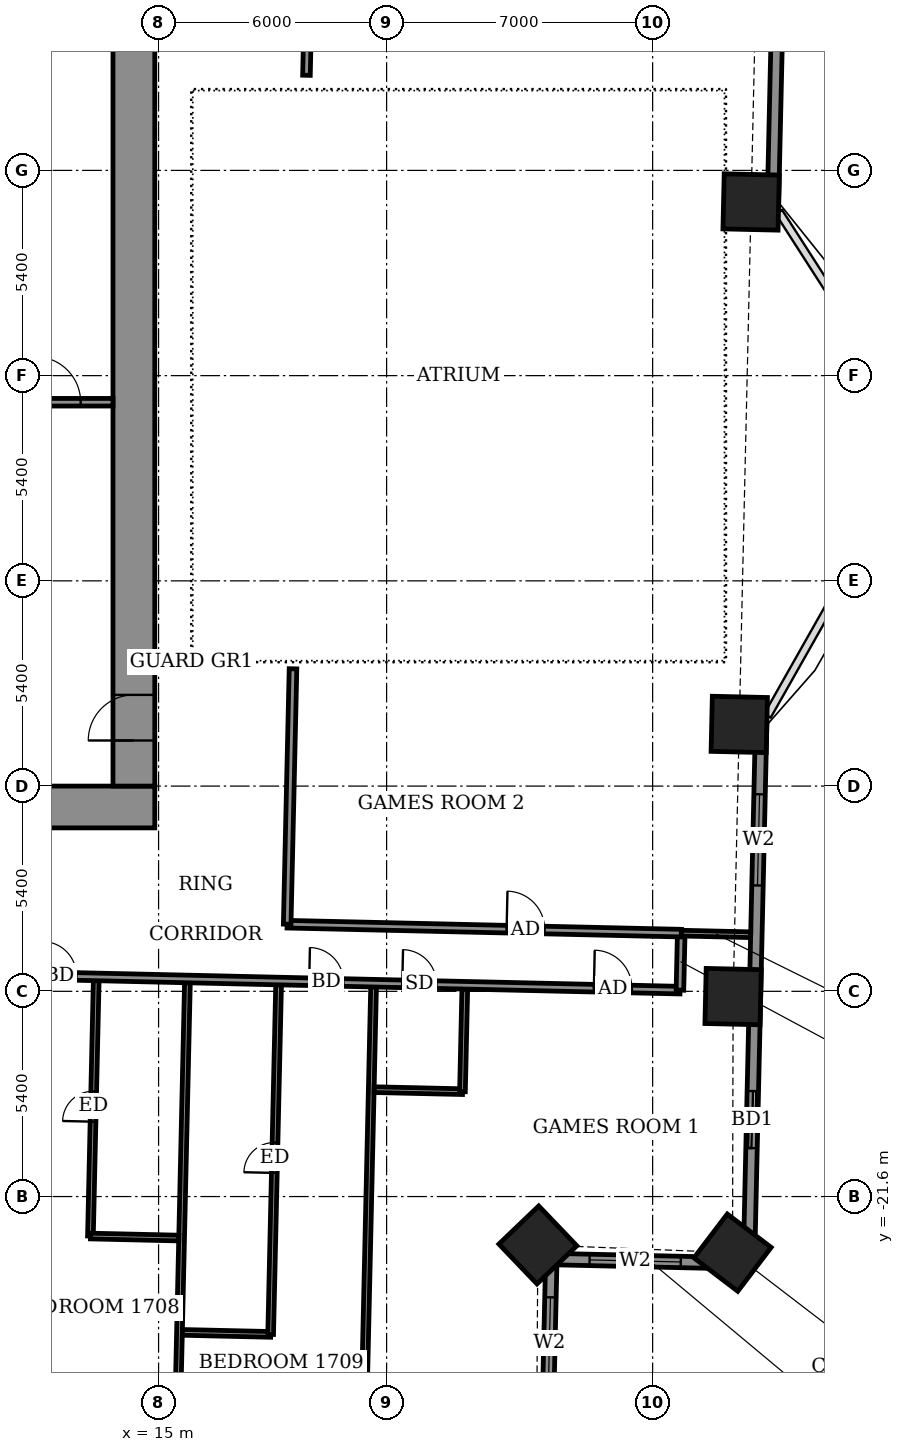
"""IFC4 building model, lengths in metres.
Left out: names, types, materials, properties, quantities, classifications, styles, units other than length and angle.
Written with IfcOpenShell. Run it as: python <this file> out.ifc"""

import sys

from ifc_helpers import new_model, si_unit, direction, frame, frame_2d, origin, origin_2d, place, context, subcontext, project, spatial, rectangle, extrude, element, fill, save


model = new_model("IFC4")
c1 = context("Model", 3, precision=1e-05, world=origin(), true_north=direction((0.0, 1.0)))
c2 = subcontext(c1, "Body", "Model", "MODEL_VIEW")
j1 = project(units=[si_unit("LENGTHUNIT", "METRE"), si_unit("PLANEANGLEUNIT", "RADIAN")], contexts=[c1])
p1 = place(None, origin())
s1 = spatial("IfcSite", under=j1, at=p1, CompositionType="ELEMENT")
p2 = place(p1, origin())
s2 = spatial("IfcBuilding", under=s1, at=p2, CompositionType="ELEMENT")
p3 = place(p2, frame((0.0, 0.0, 71.1)))
s3 = spatial("IfcBuildingStorey", under=s2, at=p3, CompositionType="ELEMENT", Elevation=71.1)
for number, where, z_axis, x_axis in (
    (1, (24.98, -22.873, -0.55), (0.0, 0.0, 1.0), (0.723, 0.691, 0.0)),
    (2, (30.102, -23.076, -0.55), (0.0, 0.0, 1.0), (0.606, 0.796, 0.0)),
    (3, (30.117, -16.339, -0.55), (0.0, 0.0, 1.0), (0.023, 1.0, 0.0)),
    (4, (30.279, -9.177, -0.55), (0.0, 0.0, 1.0), (0.023, 1.0, 0.0)),
    (5, (30.591, 4.569, -0.55), (0.0, 0.0, 1.0), (0.023, 1.0, 0.0)),
):
    element("IfcColumn", number, at=place(p3, frame(where, z_axis=z_axis, x_axis=x_axis)), inside=s3, PredefinedType="COLUMN", context=c2, shape_type="SweptSolid", body=[
        extrude(rectangle(XDim=1.45, YDim=1.45, at=origin_2d()), origin(), (0.0, 0.0, 1.0), 3.6),
    ])
p4 = place(p3, frame((30.533, -23.362, 0.0), z_axis=(0.0, 0.0, 1.0), x_axis=(0.022698800888, 0.999742349027, 0.0)))
e6 = element("IfcWall", 6, at=p4, inside=s3, PredefinedType="SOLIDWALL", context=c2, shape_type="SweptSolid", body=[
    extrude(rectangle(XDim=14.23, YDim=0.3, at=frame_2d((7.115, 0.0))), origin(), (0.0, 0.0, 1.0), 3.05),
])
p5 = place(p4, frame((3.038, 0.0, 0.0)))
e7 = element("IfcOpeningElement", 7, at=p5, cuts=e6, PredefinedType="OPENING", context=c2, shape_type="SweptSolid", body=[
    extrude(rectangle(XDim=1.5, YDim=2.4, at=frame_2d((0.75, 1.2))), frame((0.0, 0.16, 0.0), z_axis=(0.0, -1.0, 0.0), x_axis=(1.0, 0.0, 0.0)), (0.0, 0.0, 1.0), 0.32),
])
p6 = place(p4, frame((9.95, 0.0, 0.9)))
e8 = element("IfcOpeningElement", 8, at=p6, cuts=e6, PredefinedType="OPENING", context=c2, shape_type="SweptSolid", body=[
    extrude(rectangle(XDim=2.4, YDim=1.5, at=frame_2d((1.2, 0.75))), frame((0.0, 0.16, 0.0), z_axis=(0.0, -1.0, 0.0), x_axis=(1.0, 0.0, 0.0)), (0.0, 0.0, 1.0), 0.32),
])
p7 = place(p3, frame((31.165, 4.502, 0.0), z_axis=(0.0, 0.0, 1.0), x_axis=(0.022716307128, 0.999741951401, 0.0)))
e9 = element("IfcWall", 9, at=p7, inside=s3, PredefinedType="SOLIDWALL", context=c2, shape_type="SweptSolid", body=[
    extrude(rectangle(XDim=15.229, YDim=0.3, at=frame_2d((7.615, 0.0))), origin(), (0.0, 0.0, 1.0), 3.05),
])
p8 = place(p7, frame((6.059, 0.0, 0.9)))
e10 = element("IfcOpeningElement", 10, at=p8, cuts=e9, PredefinedType="OPENING", context=c2, shape_type="SweptSolid", body=[
    extrude(rectangle(XDim=0.9, YDim=1.5, at=frame_2d((0.45, 0.75))), frame((0.0, 0.16, 0.0), z_axis=(0.0, -1.0, 0.0), x_axis=(1.0, 0.0, 0.0)), (0.0, 0.0, 1.0), 0.32),
])
p9 = place(p7, frame((11.697, 0.0, 0.0)))
e11 = element("IfcOpeningElement", 11, at=p9, cuts=e9, PredefinedType="OPENING", context=c2, shape_type="SweptSolid", body=[
    extrude(rectangle(XDim=1.5, YDim=2.4, at=frame_2d((0.75, 1.2))), frame((0.0, 0.16, 0.0), z_axis=(0.0, -1.0, 0.0), x_axis=(1.0, 0.0, 0.0)), (0.0, 0.0, 1.0), 0.32),
])
p10 = place(p3, frame((25.216, -28.443, 0.0), z_axis=(0.0, 0.0, 1.0), x_axis=(0.022674484462, 0.999742900827, 0.0)))
e12 = element("IfcWall", 12, at=p10, inside=s3, PredefinedType="SOLIDWALL", context=c2, shape_type="SweptSolid", body=[
    extrude(rectangle(XDim=5.2, YDim=0.3, at=frame_2d((2.6, 0.0))), origin(), (0.0, 0.0, 1.0), 2.55),
])
p11 = place(p10, frame((1.793, 0.0, 0.9)))
e13 = element("IfcOpeningElement", 13, at=p11, cuts=e12, PredefinedType="OPENING", context=c2, shape_type="SweptSolid", body=[
    extrude(rectangle(XDim=2.4, YDim=1.5, at=frame_2d((1.2, 0.75))), frame((0.0, 0.16, 0.0), z_axis=(0.0, -1.0, 0.0), x_axis=(1.0, 0.0, 0.0)), (0.0, 0.0, 1.0), 0.32),
])
p12 = place(p3, frame((25.334, -23.244, 0.0), z_axis=(0.0, 0.0, 1.0), x_axis=(0.999741811307, -0.022722471786, 0.0)))
e14 = element("IfcWall", 14, at=p12, inside=s3, PredefinedType="SOLIDWALL", context=c2, shape_type="SweptSolid", body=[
    extrude(rectangle(XDim=5.2, YDim=0.3, at=frame_2d((2.6, 0.0))), origin(), (0.0, 0.0, 1.0), 2.55),
])
p13 = place(p12, frame((1.007, 0.0, 0.9)))
e15 = element("IfcOpeningElement", 15, at=p13, cuts=e14, PredefinedType="OPENING", context=c2, shape_type="SweptSolid", body=[
    extrude(rectangle(XDim=2.4, YDim=1.5, at=frame_2d((1.2, 0.75))), frame((0.0, 0.16, 0.0), z_axis=(0.0, -1.0, 0.0), x_axis=(1.0, 0.0, 0.0)), (0.0, 0.0, 1.0), 0.32),
])
p14 = place(p3, frame((15.484, -28.072, 0.0), z_axis=(0.0, 0.0, 1.0), x_axis=(0.02273928012, 0.99974142914, 0.0)))
e16 = element("IfcWall", 16, at=p14, inside=s3, PredefinedType="PARTITIONING", context=c2, shape_type="SweptSolid", body=[
    extrude(rectangle(XDim=12.1, YDim=0.15, at=frame_2d((6.05, 0.0))), origin(), (0.0, 0.0, 1.0), 2.55),
])
p15 = place(p3, frame((20.383, -28.183, 0.0), z_axis=(0.0, 0.0, 1.0), x_axis=(0.022637991173, 0.99974372784, 0.0)))
e17 = element("IfcWall", 17, at=p15, inside=s3, PredefinedType="PARTITIONING", context=c2, shape_type="SweptSolid", body=[
    extrude(rectangle(XDim=12.1, YDim=0.15, at=frame_2d((6.05, 0.0))), origin(), (0.0, 0.0, 1.0), 2.55),
])
p16 = place(p3, frame((15.627, -25.174, 0.0), z_axis=(0.0, 0.0, 1.0), x_axis=(0.999740260747, -0.02279059109, 0.0)))
e18 = element("IfcWall", 18, at=p16, inside=s3, PredefinedType="PARTITIONING", context=c2, shape_type="SweptSolid", body=[
    extrude(rectangle(XDim=2.324, YDim=0.15, at=frame_2d((1.162, 0.0))), origin(), (0.0, 0.0, 1.0), 3.05),
])
p17 = place(p3, frame((17.949, -25.227, 0.0), z_axis=(0.0, 0.0, 1.0), x_axis=(0.02271477479, 0.999741986218, 0.0)))
e19 = element("IfcWall", 19, at=p17, inside=s3, PredefinedType="PARTITIONING", context=c2, shape_type="SweptSolid", body=[
    extrude(rectangle(XDim=9.2, YDim=0.15, at=frame_2d((4.6, 0.0))), origin(), (0.0, 0.0, 1.0), 3.05),
])
p18 = place(p17, frame((4.25, 0.0, 0.0)))
e20 = element("IfcOpeningElement", 20, at=p18, cuts=e19, PredefinedType="OPENING", context=c2, shape_type="SweptSolid", body=[
    extrude(rectangle(XDim=0.8, YDim=2.1, at=frame_2d((0.4, 1.05))), frame((0.0, 0.085, 0.0), z_axis=(0.0, -1.0, 0.0), x_axis=(1.0, 0.0, 0.0)), (0.0, 0.0, 1.0), 0.17),
])
p19 = place(p3, frame((13.207, -22.639, 0.0), z_axis=(0.0, 0.0, 1.0), x_axis=(0.022595152847, 0.999744696944, 0.0)))
e21 = element("IfcWall", 21, at=p19, inside=s3, PredefinedType="PARTITIONING", context=c2, shape_type="SweptSolid", body=[
    extrude(rectangle(XDim=6.721, YDim=0.15, at=frame_2d((3.36, 0.0))), origin(), (0.0, 0.0, 1.0), 3.05),
])
p20 = place(p19, frame((3.01, 0.0, 0.0)))
e22 = element("IfcOpeningElement", 22, at=p20, cuts=e21, PredefinedType="OPENING", context=c2, shape_type="SweptSolid", body=[
    extrude(rectangle(XDim=0.8, YDim=2.1, at=frame_2d((0.4, 1.05))), frame((0.0, 0.085, 0.0), z_axis=(0.0, -1.0, 0.0), x_axis=(1.0, 0.0, 0.0)), (0.0, 0.0, 1.0), 0.17),
])
p21 = place(p3, frame((13.209, -22.639, 0.0), z_axis=(0.0, 0.0, 1.0), x_axis=(0.999740260747, -0.02279059109, 0.0)))
e23 = element("IfcWall", 23, at=p21, inside=s3, PredefinedType="PARTITIONING", context=c2, shape_type="SweptSolid", body=[
    extrude(rectangle(XDim=2.324, YDim=0.15, at=frame_2d((1.162, 0.0))), origin(), (0.0, 0.0, 1.0), 3.05),
])
p22 = place(p3, frame((20.673, -18.787, 0.0), z_axis=(0.0, 0.0, 1.0), x_axis=(0.999740478815, -0.022781023197, 0.0)))
e24 = element("IfcWall", 24, at=p22, inside=s3, PredefinedType="PARTITIONING", context=c2, shape_type="SweptSolid", body=[
    extrude(rectangle(XDim=2.325, YDim=0.15, at=frame_2d((1.163, 0.0))), origin(), (0.0, 0.0, 1.0), 3.05),
])
p23 = place(p3, frame((22.996, -18.84, 0.0), z_axis=(0.0, 0.0, 1.0), x_axis=(0.022518033722, 0.999746436932, 0.0)))
e25 = element("IfcWall", 25, at=p23, inside=s3, PredefinedType="PARTITIONING", context=c2, shape_type="SweptSolid", body=[
    extrude(rectangle(XDim=2.7, YDim=0.15, at=frame_2d((1.35, 0.0))), origin(), (0.0, 0.0, 1.0), 3.05),
])
p24 = place(p3, frame((-26.151, -14.924, 0.0), z_axis=(0.0, 0.0, 1.0), x_axis=(0.999742750999, -0.022681089575, 0.0)))
e26 = element("IfcWall", 26, at=p24, inside=s3, PredefinedType="PARTITIONING", context=c2, shape_type="SweptSolid", body=[
    extrude(rectangle(XDim=54.886, YDim=0.2, at=frame_2d((27.443, 0.0))), origin(), (0.0, 0.0, 1.0), 3.05),
])
p25 = place(p24, frame((1.345, 0.0, 0.0)))
e27 = element("IfcOpeningElement", 27, at=p25, cuts=e26, PredefinedType="OPENING", context=c2, shape_type="SweptSolid", body=[
    extrude(rectangle(XDim=1.0, YDim=2.1, at=frame_2d((0.5, 1.05))), frame((0.0, 0.11, 0.0), z_axis=(0.0, -1.0, 0.0), x_axis=(1.0, 0.0, 0.0)), (0.0, 0.0, 1.0), 0.22),
])
p26 = place(p24, frame((8.35, 0.0, 0.0)))
e28 = element("IfcOpeningElement", 28, at=p26, cuts=e26, PredefinedType="OPENING", context=c2, shape_type="SweptSolid", body=[
    extrude(rectangle(XDim=0.9, YDim=2.1, at=frame_2d((0.45, 1.05))), frame((0.0, 0.11, 0.0), z_axis=(0.0, -1.0, 0.0), x_axis=(1.0, 0.0, 0.0)), (0.0, 0.0, 1.0), 0.22),
])
p27 = place(p24, frame((10.625, 0.0, 0.0)))
e29 = element("IfcOpeningElement", 29, at=p27, cuts=e26, PredefinedType="OPENING", context=c2, shape_type="SweptSolid", body=[
    extrude(rectangle(XDim=0.9, YDim=2.1, at=frame_2d((0.45, 1.05))), frame((0.0, 0.11, 0.0), z_axis=(0.0, -1.0, 0.0), x_axis=(1.0, 0.0, 0.0)), (0.0, 0.0, 1.0), 0.22),
])
p28 = place(p24, frame((17.675, 0.0, 0.0)))
e30 = element("IfcOpeningElement", 30, at=p28, cuts=e26, PredefinedType="OPENING", context=c2, shape_type="SweptSolid", body=[
    extrude(rectangle(XDim=0.9, YDim=2.1, at=frame_2d((0.45, 1.05))), frame((0.0, 0.11, 0.0), z_axis=(0.0, -1.0, 0.0), x_axis=(1.0, 0.0, 0.0)), (0.0, 0.0, 1.0), 0.22),
])
p29 = place(p24, frame((19.725, 0.0, 0.0)))
e31 = element("IfcOpeningElement", 31, at=p29, cuts=e26, PredefinedType="OPENING", context=c2, shape_type="SweptSolid", body=[
    extrude(rectangle(XDim=0.9, YDim=2.1, at=frame_2d((0.45, 1.05))), frame((0.0, 0.11, 0.0), z_axis=(0.0, -1.0, 0.0), x_axis=(1.0, 0.0, 0.0)), (0.0, 0.0, 1.0), 0.22),
])
p30 = place(p24, frame((26.575, 0.0, 0.0)))
e32 = element("IfcOpeningElement", 32, at=p30, cuts=e26, PredefinedType="OPENING", context=c2, shape_type="SweptSolid", body=[
    extrude(rectangle(XDim=0.9, YDim=2.1, at=frame_2d((0.45, 1.05))), frame((0.0, 0.11, 0.0), z_axis=(0.0, -1.0, 0.0), x_axis=(1.0, 0.0, 0.0)), (0.0, 0.0, 1.0), 0.22),
])
p31 = place(p24, frame((28.75, 0.0, 0.0)))
e33 = element("IfcOpeningElement", 33, at=p31, cuts=e26, PredefinedType="OPENING", context=c2, shape_type="SweptSolid", body=[
    extrude(rectangle(XDim=0.9, YDim=2.1, at=frame_2d((0.45, 1.05))), frame((0.0, 0.11, 0.0), z_axis=(0.0, -1.0, 0.0), x_axis=(1.0, 0.0, 0.0)), (0.0, 0.0, 1.0), 0.22),
])
p32 = place(p24, frame((35.875, 0.0, 0.0)))
e34 = element("IfcOpeningElement", 34, at=p32, cuts=e26, PredefinedType="OPENING", context=c2, shape_type="SweptSolid", body=[
    extrude(rectangle(XDim=0.9, YDim=2.1, at=frame_2d((0.45, 1.05))), frame((0.0, 0.11, 0.0), z_axis=(0.0, -1.0, 0.0), x_axis=(1.0, 0.0, 0.0)), (0.0, 0.0, 1.0), 0.22),
])
p33 = place(p24, frame((38.1, 0.0, 0.0)))
e35 = element("IfcOpeningElement", 35, at=p33, cuts=e26, PredefinedType="OPENING", context=c2, shape_type="SweptSolid", body=[
    extrude(rectangle(XDim=0.9, YDim=2.1, at=frame_2d((0.45, 1.05))), frame((0.0, 0.11, 0.0), z_axis=(0.0, -1.0, 0.0), x_axis=(1.0, 0.0, 0.0)), (0.0, 0.0, 1.0), 0.22),
])
p34 = place(p24, frame((45.125, 0.0, 0.0)))
e36 = element("IfcOpeningElement", 36, at=p34, cuts=e26, PredefinedType="OPENING", context=c2, shape_type="SweptSolid", body=[
    extrude(rectangle(XDim=0.9, YDim=2.1, at=frame_2d((0.45, 1.05))), frame((0.0, 0.11, 0.0), z_axis=(0.0, -1.0, 0.0), x_axis=(1.0, 0.0, 0.0)), (0.0, 0.0, 1.0), 0.22),
])
p35 = place(p24, frame((52.618, 0.0, 0.0)))
e37 = element("IfcOpeningElement", 37, at=p35, cuts=e26, PredefinedType="OPENING", context=c2, shape_type="SweptSolid", body=[
    extrude(rectangle(XDim=1.0, YDim=2.1, at=frame_2d((0.5, 1.05))), frame((0.0, 0.11, 0.0), z_axis=(0.0, -1.0, 0.0), x_axis=(1.0, 0.0, 0.0)), (0.0, 0.0, 1.0), 0.22),
])
p36 = place(p24, frame((47.575, 0.0, 0.0)))
e38 = element("IfcOpeningElement", 38, at=p36, cuts=e26, PredefinedType="OPENING", context=c2, shape_type="SweptSolid", body=[
    extrude(rectangle(XDim=0.9, YDim=2.1, at=frame_2d((0.45, 1.05))), frame((0.0, 0.11, 0.0), z_axis=(0.0, -1.0, 0.0), x_axis=(1.0, 0.0, 0.0)), (0.0, 0.0, 1.0), 0.22),
])
p37 = place(p3, frame((28.718, -16.169, 0.0), z_axis=(0.0, 0.0, 1.0), x_axis=(0.022617910375, 0.999744182344, 0.0)))
e39 = element("IfcWall", 39, at=p37, inside=s3, PredefinedType="PARTITIONING", context=c2, shape_type="SweptSolid", body=[
    extrude(rectangle(XDim=1.5, YDim=0.2, at=frame_2d((0.75, 0.0))), origin(), (0.0, 0.0, 1.0), 3.05),
])
p38 = place(p3, frame((18.382, -14.434, 0.0), z_axis=(0.0, 0.0, 1.0), x_axis=(0.999743763457, -0.022636418209, 0.0)))
e40 = element("IfcWall", 40, at=p38, inside=s3, PredefinedType="PARTITIONING", context=c2, shape_type="SweptSolid", body=[
    extrude(rectangle(XDim=10.375, YDim=0.2, at=frame_2d((5.188, 0.0))), origin(), (0.0, 0.0, 1.0), 3.05),
])
p39 = place(p38, frame((5.777, 0.0, 0.0)))
e41 = element("IfcOpeningElement", 41, at=p39, cuts=e40, PredefinedType="OPENING", context=c2, shape_type="SweptSolid", body=[
    extrude(rectangle(XDim=1.0, YDim=2.1, at=frame_2d((0.5, 1.05))), frame((0.0, 0.11, 0.0), z_axis=(0.0, -1.0, 0.0), x_axis=(1.0, 0.0, 0.0)), (0.0, 0.0, 1.0), 0.22),
])
p40 = place(p3, frame((18.384, -14.434, 0.0), z_axis=(0.0, 0.0, 1.0), x_axis=(0.022773383809, 0.999740652864, 0.0)))
e42 = element("IfcWall", 42, at=p40, inside=s3, PredefinedType="PARTITIONING", context=c2, shape_type="SweptSolid", body=[
    extrude(rectangle(XDim=6.722, YDim=0.2, at=frame_2d((3.361, 0.0))), origin(), (0.0, 0.0, 1.0), 3.05),
])
p41 = place(p3, frame((28.755, -14.669, 0.0), z_axis=(0.0, 0.0, 1.0), x_axis=(0.999735161806, -0.023013175566, 0.0)))
e43 = element("IfcWall", 43, at=p41, inside=s3, PredefinedType="PARTITIONING", context=c2, shape_type="SweptSolid", body=[
    extrude(rectangle(XDim=1.825, YDim=0.15, at=frame_2d((0.912, 0.0))), origin(), (0.0, 0.0, 1.0), 2.55),
])
p42 = place(p3, frame((18.891, 7.903, 0.0), z_axis=(0.0, 0.0, 1.0), x_axis=(0.022807092041, 0.999739884446, 0.0)))
e44 = element("IfcWall", 44, at=p42, inside=s3, PredefinedType="PARTITIONING", context=c2, shape_type="SweptSolid", body=[
    extrude(rectangle(XDim=4.207, YDim=0.2, at=frame_2d((2.104, 0.0))), origin(), (0.0, 0.0, 1.0), 3.05),
])
p43 = place(p3, frame((-14.9, -11.35, 0.0), z_axis=(0.0, 0.0, 1.0), x_axis=(1.0, 0.0, 0.0)))
e45 = element("IfcWall", 45, at=p43, inside=s3, PredefinedType="SHEAR", context=c2, shape_type="SweptSolid", body=[
    extrude(rectangle(XDim=29.8, YDim=1.1, at=frame_2d((14.9, 0.0))), origin(), (0.0, 0.0, 1.0), 3.6),
])
p44 = place(p3, frame((14.35, -10.8, 0.0), z_axis=(0.0, 0.0, 1.0), x_axis=(0.0, 1.0, 0.0)))
e46 = element("IfcWall", 46, at=p44, inside=s3, PredefinedType="SHEAR", context=c2, shape_type="SweptSolid", body=[
    extrude(rectangle(XDim=21.6, YDim=1.1, at=frame_2d((10.8, 0.0))), origin(), (0.0, 0.0, 1.0), 3.6),
])
p45 = place(p44, frame((1.2, 0.0, 0.0)))
e47 = element("IfcOpeningElement", 47, at=p45, cuts=e46, PredefinedType="OPENING", context=c2, shape_type="SweptSolid", body=[
    extrude(rectangle(XDim=1.2, YDim=2.1, at=frame_2d((0.6, 1.05))), frame((0.0, 0.56, 0.0), z_axis=(0.0, -1.0, 0.0), x_axis=(1.0, 0.0, 0.0)), (0.0, 0.0, 1.0), 1.12),
])
p46 = place(p3, frame((10.9, -0.7, 0.0), z_axis=(0.0, 0.0, 1.0), x_axis=(1.0, 0.0, 0.0)))
e48 = element("IfcWall", 48, at=p46, inside=s3, PredefinedType="STANDARD", context=c2, shape_type="SweptSolid", body=[
    extrude(rectangle(XDim=2.9, YDim=0.2, at=frame_2d((1.45, 0.0))), origin(), (0.0, 0.0, 1.0), 3.05),
])
p47 = place(p46, frame((0.85, 0.0, 0.0)))
e49 = element("IfcOpeningElement", 49, at=p47, cuts=e48, PredefinedType="OPENING", context=c2, shape_type="SweptSolid", body=[
    extrude(rectangle(XDim=1.2, YDim=2.1, at=frame_2d((0.6, 1.05))), frame((0.0, 0.11, 0.0), z_axis=(0.0, -1.0, 0.0), x_axis=(1.0, 0.0, 0.0)), (0.0, 0.0, 1.0), 0.22),
])
p48 = place(p5, origin())
e50 = element("IfcDoor", 50, at=p48, inside=s3, OperationType="SLIDING_TO_LEFT", PredefinedType="DOOR", context=c2, shape_type="SweptSolid", body=[
    extrude(rectangle(XDim=1.5, YDim=2.4, at=frame_2d((0.75, 1.2))), frame((0.0, 0.025, 0.0), z_axis=(0.0, -1.0, 0.0), x_axis=(1.0, 0.0, 0.0)), (0.0, 0.0, 1.0), 0.05),
])
fill(e7, e50)
p49 = place(p6, origin())
e51 = element("IfcWindow", 51, at=p49, inside=s3, PartitioningType="DOUBLE_PANEL_VERTICAL", PredefinedType="WINDOW", context=c2, shape_type="SweptSolid", body=[
    extrude(rectangle(XDim=2.4, YDim=1.5, at=frame_2d((1.2, 0.75))), frame((0.0, 0.03, 0.0), z_axis=(0.0, -1.0, 0.0), x_axis=(1.0, 0.0, 0.0)), (0.0, 0.0, 1.0), 0.06),
])
fill(e8, e51)
p50 = place(p11, origin())
e52 = element("IfcWindow", 52, at=p50, inside=s3, PartitioningType="DOUBLE_PANEL_VERTICAL", PredefinedType="WINDOW", context=c2, shape_type="SweptSolid", body=[
    extrude(rectangle(XDim=2.4, YDim=1.5, at=frame_2d((1.2, 0.75))), frame((0.0, 0.03, 0.0), z_axis=(0.0, -1.0, 0.0), x_axis=(1.0, 0.0, 0.0)), (0.0, 0.0, 1.0), 0.06),
])
fill(e13, e52)
p51 = place(p13, origin())
e53 = element("IfcWindow", 53, at=p51, inside=s3, PartitioningType="DOUBLE_PANEL_VERTICAL", PredefinedType="WINDOW", context=c2, shape_type="SweptSolid", body=[
    extrude(rectangle(XDim=2.4, YDim=1.5, at=frame_2d((1.2, 0.75))), frame((0.0, 0.03, 0.0), z_axis=(0.0, -1.0, 0.0), x_axis=(1.0, 0.0, 0.0)), (0.0, 0.0, 1.0), 0.06),
])
fill(e15, e53)
p52 = place(p33, origin())
e54 = element("IfcDoor", 54, at=p52, inside=s3, OperationType="SINGLE_SWING_RIGHT", PredefinedType="DOOR", context=c2, shape_type="SweptSolid", body=[
    extrude(rectangle(XDim=0.9, YDim=2.1, at=frame_2d((0.45, 1.05))), frame((0.0, 0.025, 0.0), z_axis=(0.0, -1.0, 0.0), x_axis=(1.0, 0.0, 0.0)), (0.0, 0.0, 1.0), 0.05),
])
fill(e35, e54)
p53 = place(p20, origin())
e55 = element("IfcDoor", 55, at=p53, inside=s3, OperationType="SINGLE_SWING_RIGHT", PredefinedType="DOOR", context=c2, shape_type="SweptSolid", body=[
    extrude(rectangle(XDim=0.8, YDim=2.1, at=frame_2d((0.4, 1.05))), frame((0.0, 0.025, 0.0), z_axis=(0.0, -1.0, 0.0), x_axis=(1.0, 0.0, 0.0)), (0.0, 0.0, 1.0), 0.05),
])
fill(e22, e55)
p54 = place(p34, origin())
e56 = element("IfcDoor", 56, at=p54, inside=s3, OperationType="SINGLE_SWING_LEFT", PredefinedType="DOOR", context=c2, shape_type="SweptSolid", body=[
    extrude(rectangle(XDim=0.9, YDim=2.1, at=frame_2d((0.45, 1.05))), frame((0.0, 0.025, 0.0), z_axis=(0.0, -1.0, 0.0), x_axis=(1.0, 0.0, 0.0)), (0.0, 0.0, 1.0), 0.05),
])
fill(e36, e56)
p55 = place(p18, origin())
e57 = element("IfcDoor", 57, at=p55, inside=s3, OperationType="SINGLE_SWING_LEFT", PredefinedType="DOOR", context=c2, shape_type="SweptSolid", body=[
    extrude(rectangle(XDim=0.8, YDim=2.1, at=frame_2d((0.4, 1.05))), frame((0.0, 0.025, 0.0), z_axis=(0.0, -1.0, 0.0), x_axis=(1.0, 0.0, 0.0)), (0.0, 0.0, 1.0), 0.05),
])
fill(e20, e57)
p56 = place(p35, origin())
e58 = element("IfcDoor", 58, at=p56, inside=s3, OperationType="SINGLE_SWING_RIGHT", PredefinedType="DOOR", context=c2, shape_type="SweptSolid", body=[
    extrude(rectangle(XDim=1.0, YDim=2.1, at=frame_2d((0.5, 1.05))), frame((0.0, 0.025, 0.0), z_axis=(0.0, -1.0, 0.0), x_axis=(1.0, 0.0, 0.0)), (0.0, 0.0, 1.0), 0.05),
])
fill(e37, e58)
p57 = place(p36, origin())
e59 = element("IfcDoor", 59, at=p57, inside=s3, OperationType="SINGLE_SWING_LEFT", PredefinedType="DOOR", context=c2, shape_type="SweptSolid", body=[
    extrude(rectangle(XDim=0.9, YDim=2.1, at=frame_2d((0.45, 1.05))), frame((0.0, 0.025, 0.0), z_axis=(0.0, -1.0, 0.0), x_axis=(1.0, 0.0, 0.0)), (0.0, 0.0, 1.0), 0.05),
])
fill(e38, e59)
p58 = place(p39, origin())
e60 = element("IfcDoor", 60, at=p58, inside=s3, OperationType="SINGLE_SWING_LEFT", PredefinedType="DOOR", context=c2, shape_type="SweptSolid", body=[
    extrude(rectangle(XDim=1.0, YDim=2.1, at=frame_2d((0.5, 1.05))), frame((0.0, 0.025, 0.0), z_axis=(0.0, -1.0, 0.0), x_axis=(1.0, 0.0, 0.0)), (0.0, 0.0, 1.0), 0.05),
])
fill(e41, e60)
p59 = place(p45, origin())
e61 = element("IfcDoor", 61, at=p59, inside=s3, OperationType="DOUBLE_DOOR_SINGLE_SWING", PredefinedType="DOOR", context=c2, shape_type="SweptSolid", body=[
    extrude(rectangle(XDim=1.2, YDim=2.1, at=frame_2d((0.6, 1.05))), frame((0.0, 0.025, 0.0), z_axis=(0.0, -1.0, 0.0), x_axis=(1.0, 0.0, 0.0)), (0.0, 0.0, 1.0), 0.05),
])
fill(e47, e61)
p60 = place(p47, origin())
e62 = element("IfcDoor", 62, at=p60, inside=s3, OperationType="SINGLE_SWING_LEFT", PredefinedType="DOOR", context=c2, shape_type="SweptSolid", body=[
    extrude(rectangle(XDim=1.2, YDim=2.1, at=frame_2d((0.6, 1.05))), frame((0.0, 0.025, 0.0), z_axis=(0.0, -1.0, 0.0), x_axis=(1.0, 0.0, 0.0)), (0.0, 0.0, 1.0), 0.05),
])
fill(e49, e62)
save(model, sys.argv[1])
